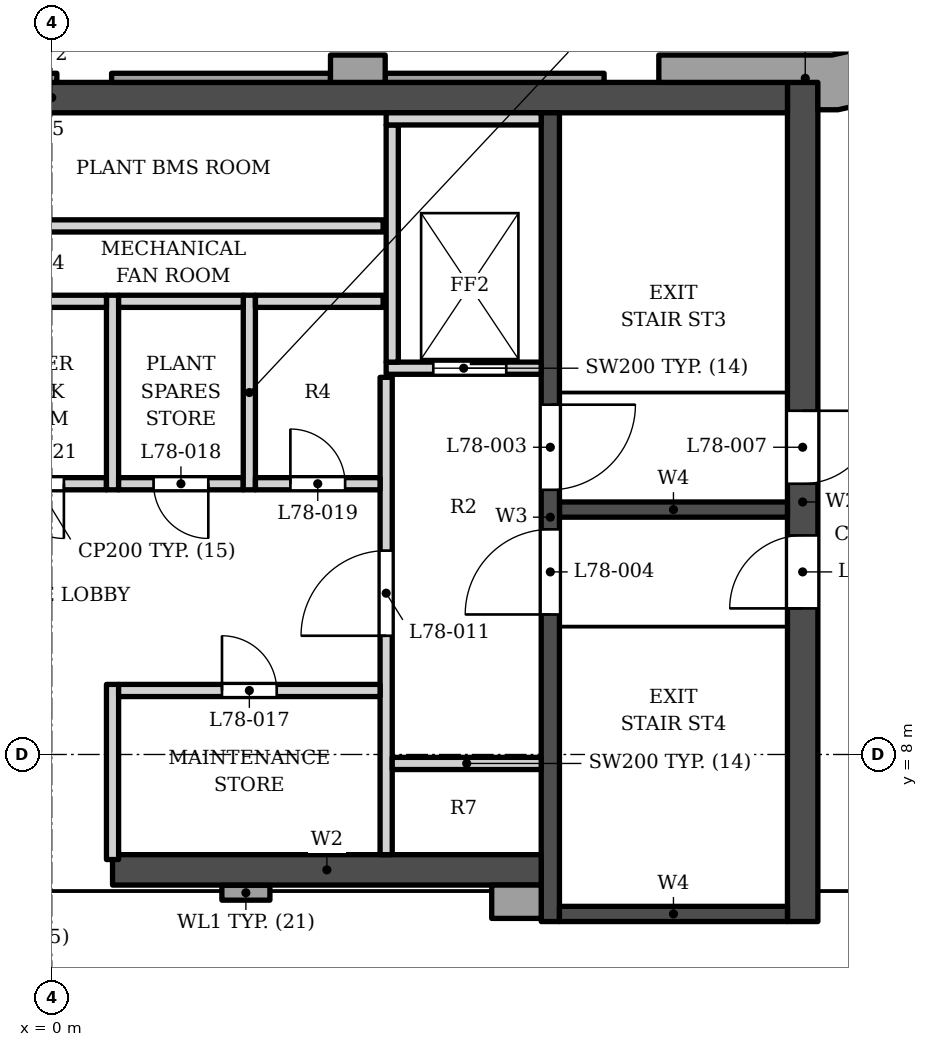
"""IFC4 building model, lengths in metres.
Left out: names, types, materials, properties, quantities, classifications, styles, units other than length and angle.
Written with IfcOpenShell. Run it as: python <this file> out.ifc"""

import sys

from ifc_helpers import new_model, si_unit, direction, frame, frame_2d, origin, place, context, subcontext, project, spatial, polyline, rectangle, outline, extrude, element, fill, save


model = new_model("IFC4")
c1 = context("Model", 3, precision=1e-05, world=origin(), true_north=direction((0.0, 1.0)))
c2 = subcontext(c1, "Body", "Model", "MODEL_VIEW")
j1 = project(units=[si_unit("LENGTHUNIT", "METRE"), si_unit("PLANEANGLEUNIT", "RADIAN")], contexts=[c1])
p1 = place(None, origin())
s1 = spatial("IfcSite", under=j1, at=p1, CompositionType="ELEMENT")
p2 = place(p1, origin())
s2 = spatial("IfcBuilding", under=s1, at=p2, CompositionType="ELEMENT")
p3 = place(p2, frame((0.0, 0.0, 335.5)))
s3 = spatial("IfcBuildingStorey", under=s2, at=p3, CompositionType="ELEMENT", Elevation=335.5)
p4 = place(p3, frame((-12.1, 18.802, 0.0), z_axis=(0.0, 0.0, 1.0), x_axis=(1.0, 0.0, 0.0)))
e1 = element("IfcWall", 1, at=p4, inside=s3, PredefinedType="SHEAR", context=c2, shape_type="SweptSolid", body=[
    extrude(rectangle(XDim=24.2, YDim=0.5, at=frame_2d((12.1, 0.0))), origin(), (0.0, 0.0, 1.0), 5.0),
])
p5 = place(p3, frame((12.35, 5.253, 0.0), z_axis=(0.0, 0.0, 1.0), x_axis=(0.0, 1.0, 0.0)))
e2 = element("IfcWall", 2, at=p5, inside=s3, PredefinedType="SHEAR", context=c2, shape_type="SweptSolid", body=[
    extrude(outline(polyline([(0.0, 0.0), (13.8, 0.0), (13.8, 5.0), (2.081, 5.0), (0.0, 3.254), (0.0, 0.0)])), frame((0.0, 0.25, 0.0), z_axis=(0.0, -1.0, 0.0), x_axis=(1.0, 0.0, 0.0)), (0.0, 0.0, 1.0), 0.5),
])
p6 = place(p5, frame((7.2, 0.0, 0.0)))
e3 = element("IfcOpeningElement", 3, at=p6, cuts=e2, PredefinedType="OPENING", context=c2, shape_type="SweptSolid", body=[
    extrude(rectangle(XDim=1.2, YDim=2.1, at=frame_2d((0.6, 1.05))), frame((0.0, 0.26, 0.0), z_axis=(0.0, -1.0, 0.0), x_axis=(1.0, 0.0, 0.0)), (0.0, 0.0, 1.0), 0.52),
])
p7 = place(p5, frame((5.15, 0.0, 0.0)))
e4 = element("IfcOpeningElement", 4, at=p7, cuts=e2, PredefinedType="OPENING", context=c2, shape_type="SweptSolid", body=[
    extrude(rectangle(XDim=1.2, YDim=2.1, at=frame_2d((0.6, 1.05))), frame((0.0, 0.26, 0.0), z_axis=(0.0, -1.0, 0.0), x_axis=(1.0, 0.0, 0.0)), (0.0, 0.0, 1.0), 0.52),
])
p8 = place(p3, frame((8.2, 5.253, 0.0), z_axis=(0.0, 0.0, 1.0), x_axis=(0.0, 1.0, 0.0)))
e5 = element("IfcWall", 5, at=p8, inside=s3, PredefinedType="SHEAR", context=c2, shape_type="SweptSolid", body=[
    extrude(outline(polyline([(0.0, 0.0), (13.3, 0.0), (13.3, 5.0), (2.081, 5.0), (0.0, 3.254), (0.0, 0.0)])), frame((0.0, 0.15, 0.0), z_axis=(0.0, -1.0, 0.0), x_axis=(1.0, 0.0, 0.0)), (0.0, 0.0, 1.0), 0.3),
])
p9 = place(p8, frame((7.1, 0.0, 0.0)))
e6 = element("IfcOpeningElement", 6, at=p9, cuts=e5, PredefinedType="OPENING", context=c2, shape_type="SweptSolid", body=[
    extrude(rectangle(XDim=1.4, YDim=2.1, at=frame_2d((0.7, 1.05))), frame((0.0, 0.16, 0.0), z_axis=(0.0, -1.0, 0.0), x_axis=(1.0, 0.0, 0.0)), (0.0, 0.0, 1.0), 0.32),
])
p10 = place(p8, frame((5.05, 0.0, 0.0)))
e7 = element("IfcOpeningElement", 7, at=p10, cuts=e5, PredefinedType="OPENING", context=c2, shape_type="SweptSolid", body=[
    extrude(rectangle(XDim=1.4, YDim=2.1, at=frame_2d((0.7, 1.05))), frame((0.0, 0.16, 0.0), z_axis=(0.0, -1.0, 0.0), x_axis=(1.0, 0.0, 0.0)), (0.0, 0.0, 1.0), 0.32),
])
p11 = place(p3, frame((8.35, 12.028, 0.0), z_axis=(0.0, 0.0, 1.0), x_axis=(1.0, 0.0, 0.0)))
e8 = element("IfcWall", 8, at=p11, inside=s3, PredefinedType="SHEAR", context=c2, shape_type="SweptSolid", body=[
    extrude(rectangle(XDim=3.75, YDim=0.25, at=frame_2d((1.875, 0.0))), origin(), (0.0, 0.0, 1.0), 5.0),
])
p12 = place(p3, frame((8.35, 5.378, 0.0), z_axis=(0.0, 0.0, 1.0), x_axis=(1.0, 0.0, 0.0)))
e9 = element("IfcWall", 9, at=p12, inside=s3, PredefinedType="SHEAR", context=c2, shape_type="SweptSolid", body=[
    extrude(rectangle(XDim=3.75, YDim=0.25, at=frame_2d((1.875, 0.0))), origin(), (0.0, 0.0, 1.0), 3.254),
])
p13 = place(p3, frame((1.0, 6.103, 0.0), z_axis=(0.0, 0.0, 1.0), x_axis=(1.0, 0.0, 0.0)))
e10 = element("IfcWall", 10, at=p13, inside=s3, PredefinedType="SHEAR", context=c2, shape_type="SweptSolid", body=[
    extrude(rectangle(XDim=7.05, YDim=0.5, at=frame_2d((3.525, 0.0))), origin(), (0.0, 0.0, 1.0), 3.758),
])
p14 = place(p3, origin())
e11 = element("IfcWall", 11, at=p14, inside=s3, PredefinedType="SOLIDWALL", context=c2, shape_type="SweptSolid", body=[
    extrude(outline(polyline([(7.236, 5.304), (8.05, 5.304), (8.05, 5.853), (7.236, 5.853), (7.236, 5.304)])), origin(), (0.0, 0.0, 1.0), 3.297),
])
p15 = place(p3, origin())
e12 = element("IfcWall", 12, at=p15, inside=s3, PredefinedType="SOLIDWALL", context=c2, shape_type="SweptSolid", body=[
    extrude(outline(polyline([(4.584, 19.502), (4.584, 19.052), (5.484, 19.052), (5.484, 19.502), (4.584, 19.502)])), origin(), (0.0, 0.0, 1.0), 3.8),
])
p16 = place(p3, origin())
e13 = element("IfcWall", 13, at=p16, inside=s3, PredefinedType="ELEMENTEDWALL", context=c2, shape_type="SweptSolid", body=[
    extrude(outline(polyline([(9.084, 19.203), (5.484, 19.203), (5.484, 19.052), (9.084, 19.052), (9.084, 19.203)])), origin(), (0.0, 0.0, 1.0), 3.8),
])
p17 = place(p3, origin())
e14 = element("IfcWall", 14, at=p17, inside=s3, PredefinedType="ELEMENTEDWALL", context=c2, shape_type="SweptSolid", body=[
    extrude(outline(polyline([(4.584, 19.203), (0.984, 19.203), (0.984, 19.052), (4.584, 19.052), (4.584, 19.203)])), origin(), (0.0, 0.0, 1.0), 3.8),
])
p18 = place(p3, origin())
e15 = element("IfcWall", 15, at=p18, inside=s3, PredefinedType="ELEMENTEDWALL", context=c2, shape_type="SweptSolid", body=[
    extrude(outline(polyline([(0.084, 19.203), (-3.516, 19.203), (-3.516, 19.052), (0.084, 19.052), (0.084, 19.203)])), origin(), (0.0, 0.0, 1.0), 3.8),
])
p19 = place(p3, origin())
e16 = element("IfcWall", 16, at=p19, inside=s3, PredefinedType="SOLIDWALL", context=c2, shape_type="SweptSolid", body=[
    extrude(outline(polyline([(14.008, 19.761), (12.833, 19.502), (9.984, 19.502), (9.984, 19.052), (12.6, 19.052), (12.6, 18.603), (12.93, 18.603), (14.201, 18.883), (14.008, 19.761)])), origin(), (0.0, 0.0, 1.0), 3.8),
])
p20 = place(p3, frame((4.584, 19.278, 3.8), z_axis=(0.0, 0.0, 1.0), x_axis=(1.0, 0.0, 0.0)))
e17 = element("IfcWall", 17, at=p20, inside=s3, PredefinedType="ELEMENTEDWALL", context=c2, shape_type="SweptSolid", body=[
    extrude(rectangle(XDim=0.9, YDim=0.45, at=frame_2d((0.45, 0.0))), origin(), (0.0, 0.0, 1.0), 10.851),
])
p21 = place(p3, frame((2.798, 5.727, 0.0), z_axis=(0.0, 0.0, 1.0), x_axis=(1.0, 0.0, 0.0)))
e18 = element("IfcWall", 18, at=p21, inside=s3, PredefinedType="ELEMENTEDWALL", context=c2, shape_type="SweptSolid", body=[
    extrude(rectangle(XDim=0.79, YDim=0.244, at=frame_2d((0.395, 0.0))), origin(), (0.0, 0.0, 1.0), 3.279),
])
p22 = place(p3, frame((1.0, 6.273, 0.0), z_axis=(0.0, 0.0, 1.0), x_axis=(0.0, 1.0, 0.0)))
e19 = element("IfcWall", 19, at=p22, inside=s3, PredefinedType="PARTITIONING", context=c2, shape_type="SweptSolid", body=[
    extrude(outline(polyline([(0.0, 0.0), (2.88, 0.0), (2.88, 4.7), (0.703, 4.7), (0.0, 4.11), (0.0, 0.0)])), frame((0.0, 0.1, 0.0), z_axis=(0.0, -1.0, 0.0), x_axis=(1.0, 0.0, 0.0)), (0.0, 0.0, 1.0), 0.2),
])
p23 = place(p3, frame((5.5, 6.353, 0.0), z_axis=(0.0, 0.0, 1.0), x_axis=(0.0, 1.0, 0.0)))
e20 = element("IfcWall", 20, at=p23, inside=s3, PredefinedType="SOLIDWALL", context=c2, shape_type="SweptSolid", body=[
    extrude(outline(polyline([(0.0, 0.0), (7.85, 0.0), (7.85, 4.7), (0.623, 4.7), (0.0, 4.177), (0.0, 0.0)])), frame((0.0, 0.1, 0.0), z_axis=(0.0, -1.0, 0.0), x_axis=(1.0, 0.0, 0.0)), (0.0, 0.0, 1.0), 0.2),
])
p24 = place(p23, frame((3.6, 0.0, 0.0)))
e21 = element("IfcOpeningElement", 21, at=p24, cuts=e20, PredefinedType="OPENING", context=c2, shape_type="SweptSolid", body=[
    extrude(rectangle(XDim=1.4, YDim=2.1, at=frame_2d((0.7, 1.05))), frame((0.0, 0.11, 0.0), z_axis=(0.0, -1.0, 0.0), x_axis=(1.0, 0.0, 0.0)), (0.0, 0.0, 1.0), 0.22),
])
p25 = place(p3, frame((5.6, 7.853, 0.0), z_axis=(0.0, 0.0, 1.0), x_axis=(1.0, 0.0, 0.0)))
e22 = element("IfcWall", 22, at=p25, inside=s3, PredefinedType="SOLIDWALL", context=c2, shape_type="SweptSolid", body=[
    extrude(rectangle(XDim=2.45, YDim=0.2, at=frame_2d((1.225, 0.0))), origin(), (0.0, 0.0, 1.0), 4.7),
])
p26 = place(p3, frame((1.1, 9.052, 0.0), z_axis=(0.0, 0.0, 1.0), x_axis=(1.0, 0.0, 0.0)))
e23 = element("IfcWall", 23, at=p26, inside=s3, PredefinedType="PARTITIONING", context=c2, shape_type="SweptSolid", body=[
    extrude(rectangle(XDim=4.3, YDim=0.2, at=frame_2d((2.15, 0.0))), origin(), (0.0, 0.0, 1.0), 4.7),
])
p27 = place(p26, frame((1.7, 0.0, 0.0)))
e24 = element("IfcOpeningElement", 24, at=p27, cuts=e23, PredefinedType="OPENING", context=c2, shape_type="SweptSolid", body=[
    extrude(rectangle(XDim=0.9, YDim=2.1, at=frame_2d((0.45, 1.05))), frame((0.0, 0.11, 0.0), z_axis=(0.0, -1.0, 0.0), x_axis=(1.0, 0.0, 0.0)), (0.0, 0.0, 1.0), 0.22),
])
p28 = place(p3, frame((-1.4, 12.453, 0.0), z_axis=(0.0, 0.0, 1.0), x_axis=(1.0, 0.0, 0.0)))
e25 = element("IfcWall", 25, at=p28, inside=s3, PredefinedType="PARTITIONING", context=c2, shape_type="SweptSolid", body=[
    extrude(rectangle(XDim=2.3, YDim=0.2, at=frame_2d((1.15, 0.0))), origin(), (0.0, 0.0, 1.0), 4.7),
])
p29 = place(p28, frame((0.7, 0.0, 0.0)))
e26 = element("IfcOpeningElement", 26, at=p29, cuts=e25, PredefinedType="OPENING", context=c2, shape_type="SweptSolid", body=[
    extrude(rectangle(XDim=0.9, YDim=2.1, at=frame_2d((0.45, 1.05))), frame((0.0, 0.11, 0.0), z_axis=(0.0, -1.0, 0.0), x_axis=(1.0, 0.0, 0.0)), (0.0, 0.0, 1.0), 0.22),
])
p30 = place(p3, frame((1.0, 12.353, 0.0), z_axis=(0.0, 0.0, 1.0), x_axis=(0.0, 1.0, 0.0)))
e27 = element("IfcWall", 27, at=p30, inside=s3, PredefinedType="PARTITIONING", context=c2, shape_type="SweptSolid", body=[
    extrude(rectangle(XDim=3.2, YDim=0.2, at=frame_2d((1.6, 0.0))), origin(), (0.0, 0.0, 1.0), 4.7),
])
p31 = place(p3, frame((1.1, 12.453, 0.0), z_axis=(0.0, 0.0, 1.0), x_axis=(1.0, 0.0, 0.0)))
e28 = element("IfcWall", 28, at=p31, inside=s3, PredefinedType="PARTITIONING", context=c2, shape_type="SweptSolid", body=[
    extrude(rectangle(XDim=2.05, YDim=0.2, at=frame_2d((1.025, 0.0))), origin(), (0.0, 0.0, 1.0), 4.7),
])
p32 = place(p31, frame((0.575, 0.0, 0.0)))
e29 = element("IfcOpeningElement", 29, at=p32, cuts=e28, PredefinedType="OPENING", context=c2, shape_type="SweptSolid", body=[
    extrude(rectangle(XDim=0.9, YDim=2.1, at=frame_2d((0.45, 1.05))), frame((0.0, 0.11, 0.0), z_axis=(0.0, -1.0, 0.0), x_axis=(1.0, 0.0, 0.0)), (0.0, 0.0, 1.0), 0.22),
])
p33 = place(p3, frame((3.25, 12.353, 0.0), z_axis=(0.0, 0.0, 1.0), x_axis=(0.0, 1.0, 0.0)))
e30 = element("IfcWall", 30, at=p33, inside=s3, PredefinedType="PARTITIONING", context=c2, shape_type="SweptSolid", body=[
    extrude(rectangle(XDim=3.2, YDim=0.2, at=frame_2d((1.6, 0.0))), origin(), (0.0, 0.0, 1.0), 4.7),
])
p34 = place(p3, frame((3.35, 12.453, 0.0), z_axis=(0.0, 0.0, 1.0), x_axis=(1.0, 0.0, 0.0)))
e31 = element("IfcWall", 31, at=p34, inside=s3, PredefinedType="PARTITIONING", context=c2, shape_type="SweptSolid", body=[
    extrude(rectangle(XDim=2.05, YDim=0.2, at=frame_2d((1.025, 0.0))), origin(), (0.0, 0.0, 1.0), 4.7),
])
p35 = place(p34, frame((0.575, 0.0, 0.0)))
e32 = element("IfcOpeningElement", 32, at=p35, cuts=e31, PredefinedType="OPENING", context=c2, shape_type="SweptSolid", body=[
    extrude(rectangle(XDim=0.9, YDim=2.1, at=frame_2d((0.45, 1.05))), frame((0.0, 0.11, 0.0), z_axis=(0.0, -1.0, 0.0), x_axis=(1.0, 0.0, 0.0)), (0.0, 0.0, 1.0), 0.22),
])
p36 = place(p3, frame((5.5, 14.353, 0.0), z_axis=(0.0, 0.0, 1.0), x_axis=(1.0, 0.0, 0.0)))
e33 = element("IfcWall", 33, at=p36, inside=s3, PredefinedType="SOLIDWALL", context=c2, shape_type="SweptSolid", body=[
    extrude(rectangle(XDim=2.55, YDim=0.2, at=frame_2d((1.275, 0.0))), origin(), (0.0, 0.0, 1.0), 4.7),
])
p37 = place(p36, frame((0.775, 0.0, 0.0)))
e34 = element("IfcOpeningElement", 34, at=p37, cuts=e33, PredefinedType="OPENING", context=c2, shape_type="SweptSolid", body=[
    extrude(rectangle(XDim=1.2, YDim=2.1, at=frame_2d((0.6, 1.05))), frame((0.0, 0.11, 0.0), z_axis=(0.0, -1.0, 0.0), x_axis=(1.0, 0.0, 0.0)), (0.0, 0.0, 1.0), 0.22),
])
p38 = place(p3, frame((5.6, 14.453, 0.0), z_axis=(0.0, 0.0, 1.0), x_axis=(0.0, 1.0, 0.0)))
e35 = element("IfcWall", 35, at=p38, inside=s3, PredefinedType="SOLIDWALL", context=c2, shape_type="SweptSolid", body=[
    extrude(rectangle(XDim=3.9, YDim=0.2, at=frame_2d((1.95, 0.0))), origin(), (0.0, 0.0, 1.0), 4.7),
])
p39 = place(p3, frame((-1.4, 15.453, 0.0), z_axis=(0.0, 0.0, 1.0), x_axis=(1.0, 0.0, 0.0)))
e36 = element("IfcWall", 36, at=p39, inside=s3, PredefinedType="PARTITIONING", context=c2, shape_type="SweptSolid", body=[
    extrude(rectangle(XDim=2.3, YDim=0.2, at=frame_2d((1.15, 0.0))), origin(), (0.0, 0.0, 1.0), 4.7),
])
p40 = place(p3, frame((1.1, 15.453, 0.0), z_axis=(0.0, 0.0, 1.0), x_axis=(1.0, 0.0, 0.0)))
e37 = element("IfcWall", 37, at=p40, inside=s3, PredefinedType="PARTITIONING", context=c2, shape_type="SweptSolid", body=[
    extrude(rectangle(XDim=2.05, YDim=0.2, at=frame_2d((1.025, 0.0))), origin(), (0.0, 0.0, 1.0), 4.7),
])
p41 = place(p3, frame((3.35, 15.453, 0.0), z_axis=(0.0, 0.0, 1.0), x_axis=(1.0, 0.0, 0.0)))
e38 = element("IfcWall", 38, at=p41, inside=s3, PredefinedType="SOLIDWALL", context=c2, shape_type="SweptSolid", body=[
    extrude(rectangle(XDim=2.1, YDim=0.2, at=frame_2d((1.05, 0.0))), origin(), (0.0, 0.0, 1.0), 4.7),
])
p42 = place(p3, frame((-1.4, 16.693, 0.0), z_axis=(0.0, 0.0, 1.0), x_axis=(1.0, 0.0, 0.0)))
e39 = element("IfcWall", 39, at=p42, inside=s3, PredefinedType="SOLIDWALL", context=c2, shape_type="SweptSolid", body=[
    extrude(rectangle(XDim=6.85, YDim=0.2, at=frame_2d((3.425, 0.0))), origin(), (0.0, 0.0, 1.0), 4.7),
])
p43 = place(p3, frame((5.5, 18.453, 0.0), z_axis=(0.0, 0.0, 1.0), x_axis=(1.0, 0.0, 0.0)))
e40 = element("IfcWall", 40, at=p43, inside=s3, PredefinedType="SOLIDWALL", context=c2, shape_type="SweptSolid", body=[
    extrude(rectangle(XDim=2.55, YDim=0.2, at=frame_2d((1.275, 0.0))), origin(), (0.0, 0.0, 1.0), 4.7),
])
p44 = place(p37, origin())
e41 = element("IfcDoor", 41, at=p44, inside=s3, OperationType="DOUBLE_DOOR_SLIDING", PredefinedType="DOOR", context=c2, shape_type="SweptSolid", body=[
    extrude(rectangle(XDim=1.2, YDim=2.1, at=frame_2d((0.6, 1.05))), frame((0.0, 0.025, 0.0), z_axis=(0.0, -1.0, 0.0), x_axis=(1.0, 0.0, 0.0)), (0.0, 0.0, 1.0), 0.05),
])
fill(e34, e41)
p45 = place(p9, origin())
e42 = element("IfcDoor", 42, at=p45, inside=s3, OperationType="SINGLE_SWING_RIGHT", PredefinedType="DOOR", context=c2, shape_type="SweptSolid", body=[
    extrude(rectangle(XDim=1.4, YDim=2.1, at=frame_2d((0.7, 1.05))), frame((0.0, 0.025, 0.0), z_axis=(0.0, -1.0, 0.0), x_axis=(1.0, 0.0, 0.0)), (0.0, 0.0, 1.0), 0.05),
])
fill(e6, e42)
p46 = place(p10, origin())
e43 = element("IfcDoor", 43, at=p46, inside=s3, OperationType="SINGLE_SWING_LEFT", PredefinedType="DOOR", context=c2, shape_type="SweptSolid", body=[
    extrude(rectangle(XDim=1.4, YDim=2.1, at=frame_2d((0.7, 1.05))), frame((0.0, 0.025, 0.0), z_axis=(0.0, -1.0, 0.0), x_axis=(1.0, 0.0, 0.0)), (0.0, 0.0, 1.0), 0.05),
])
fill(e7, e43)
p47 = place(p6, origin())
e44 = element("IfcDoor", 44, at=p47, inside=s3, OperationType="SINGLE_SWING_RIGHT", PredefinedType="DOOR", context=c2, shape_type="SweptSolid", body=[
    extrude(rectangle(XDim=1.2, YDim=2.1, at=frame_2d((0.6, 1.05))), frame((0.0, 0.025, 0.0), z_axis=(0.0, -1.0, 0.0), x_axis=(1.0, 0.0, 0.0)), (0.0, 0.0, 1.0), 0.05),
])
fill(e3, e44)
p48 = place(p7, origin())
e45 = element("IfcDoor", 45, at=p48, inside=s3, OperationType="SINGLE_SWING_LEFT", PredefinedType="DOOR", context=c2, shape_type="SweptSolid", body=[
    extrude(rectangle(XDim=1.2, YDim=2.1, at=frame_2d((0.6, 1.05))), frame((0.0, 0.025, 0.0), z_axis=(0.0, -1.0, 0.0), x_axis=(1.0, 0.0, 0.0)), (0.0, 0.0, 1.0), 0.05),
])
fill(e4, e45)
p49 = place(p24, origin())
e46 = element("IfcDoor", 46, at=p49, inside=s3, OperationType="SINGLE_SWING_LEFT", PredefinedType="DOOR", context=c2, shape_type="SweptSolid", body=[
    extrude(rectangle(XDim=1.4, YDim=2.1, at=frame_2d((0.7, 1.05))), frame((0.0, 0.025, 0.0), z_axis=(0.0, -1.0, 0.0), x_axis=(1.0, 0.0, 0.0)), (0.0, 0.0, 1.0), 0.05),
])
fill(e21, e46)
p50 = place(p27, origin())
e47 = element("IfcDoor", 47, at=p50, inside=s3, OperationType="SINGLE_SWING_LEFT", PredefinedType="DOOR", context=c2, shape_type="SweptSolid", body=[
    extrude(rectangle(XDim=0.9, YDim=2.1, at=frame_2d((0.45, 1.05))), frame((0.0, 0.025, 0.0), z_axis=(0.0, -1.0, 0.0), x_axis=(1.0, 0.0, 0.0)), (0.0, 0.0, 1.0), 0.05),
])
fill(e24, e47)
p51 = place(p32, origin())
e48 = element("IfcDoor", 48, at=p51, inside=s3, OperationType="SINGLE_SWING_RIGHT", PredefinedType="DOOR", context=c2, shape_type="SweptSolid", body=[
    extrude(rectangle(XDim=0.9, YDim=2.1, at=frame_2d((0.45, 1.05))), frame((0.0, 0.025, 0.0), z_axis=(0.0, -1.0, 0.0), x_axis=(1.0, 0.0, 0.0)), (0.0, 0.0, 1.0), 0.05),
])
fill(e29, e48)
p52 = place(p35, origin())
e49 = element("IfcDoor", 49, at=p52, inside=s3, OperationType="SINGLE_SWING_LEFT", PredefinedType="DOOR", context=c2, shape_type="SweptSolid", body=[
    extrude(rectangle(XDim=0.9, YDim=2.1, at=frame_2d((0.45, 1.05))), frame((0.0, 0.025, 0.0), z_axis=(0.0, -1.0, 0.0), x_axis=(1.0, 0.0, 0.0)), (0.0, 0.0, 1.0), 0.05),
])
fill(e32, e49)
p53 = place(p29, origin())
e50 = element("IfcDoor", 50, at=p53, inside=s3, OperationType="SINGLE_SWING_RIGHT", PredefinedType="DOOR", context=c2, shape_type="SweptSolid", body=[
    extrude(rectangle(XDim=0.9, YDim=2.1, at=frame_2d((0.45, 1.05))), frame((0.0, 0.025, 0.0), z_axis=(0.0, -1.0, 0.0), x_axis=(1.0, 0.0, 0.0)), (0.0, 0.0, 1.0), 0.05),
])
fill(e26, e50)
save(model, sys.argv[1])
